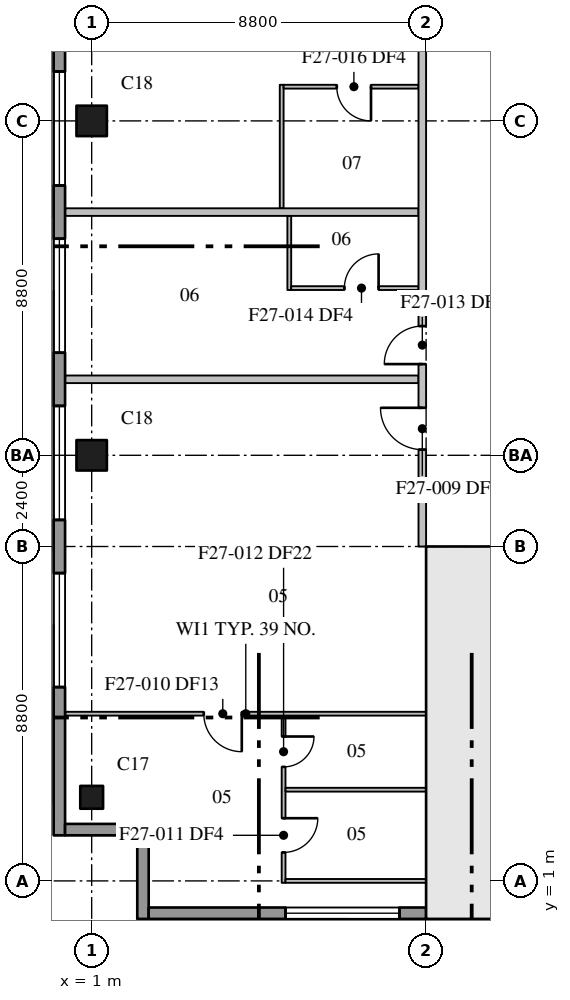
"""IFC4 building model, lengths in metres.
Left out: names, types, materials, properties, quantities, classifications, styles, units other than length and angle.
Written with IfcOpenShell. Run it as: python <this file> out.ifc"""

import sys

from ifc_helpers import new_model, si_unit, direction, frame, frame_2d, origin, origin_2d, place, context, subcontext, project, spatial, rectangle, extrude, element, fill, save


model = new_model("IFC4")
c1 = context("Model", 3, precision=1e-05, world=origin(), true_north=direction((0.0, 1.0)))
c2 = subcontext(c1, "Body", "Model", "MODEL_VIEW")
j1 = project(units=[si_unit("LENGTHUNIT", "METRE"), si_unit("PLANEANGLEUNIT", "RADIAN")], contexts=[c1])
p1 = place(None, origin())
s1 = spatial("IfcSite", under=j1, at=p1, CompositionType="ELEMENT")
p2 = place(p1, origin())
s2 = spatial("IfcBuilding", under=s1, at=p2, CompositionType="ELEMENT")
p3 = place(p2, frame((0.0, 0.0, 222.8)))
s3 = spatial("IfcBuildingStorey", under=s2, at=p3, CompositionType="ELEMENT", Elevation=222.8)
p4 = place(p3, frame((1.0, 3.2, 0.0), z_axis=(0.0, 0.0, 1.0), x_axis=(1.0, 0.0, 0.0)))
e1 = element("IfcColumn", 1, at=p4, inside=s3, PredefinedType="COLUMN", context=c2, shape_type="SweptSolid", body=[
    extrude(rectangle(XDim=0.6, YDim=0.6, at=origin_2d()), origin(), (0.0, 0.0, 1.0), 3.7),
])
for number, where, z_axis, x_axis in (
    (2, (1.0, 12.2, 0.0), (0.0, 0.0, 1.0), (1.0, 0.0, 0.0)),
    (3, (1.0, 21.0, 0.0), (0.0, 0.0, 1.0), (1.0, 0.0, 0.0)),
):
    element("IfcColumn", number, at=place(p3, frame(where, z_axis=z_axis, x_axis=x_axis)), inside=s3, PredefinedType="COLUMN", context=c2, shape_type="SweptSolid", body=[
        extrude(rectangle(XDim=0.8, YDim=0.8, at=origin_2d()), origin(), (0.0, 0.0, 1.0), 3.7),
    ])
p5 = place(p3, frame((9.8, 0.95, 0.0), z_axis=(0.0, 0.0, 1.0), x_axis=(1.0, 0.0, 0.0)))
e4 = element("IfcWall", 4, at=p5, inside=s3, PredefinedType="SHEAR", context=c2, shape_type="SweptSolid", body=[
    extrude(rectangle(XDim=35.2, YDim=0.5, at=frame_2d((17.6, 0.0))), origin(), (0.0, 0.0, 1.0), 3.7),
])
p6 = place(p3, frame((10.75, 1.2, 0.0), z_axis=(0.0, 0.0, 1.0), x_axis=(0.0, 1.0, 0.0)))
e5 = element("IfcWall", 5, at=p6, inside=s3, PredefinedType="SHEAR", context=c2, shape_type="SweptSolid", body=[
    extrude(rectangle(XDim=8.6, YDim=0.5, at=frame_2d((4.3, 0.0))), origin(), (0.0, 0.0, 1.0), 3.7),
])
p7 = place(p3, frame((9.8, 9.6, 0.0), z_axis=(0.0, 0.0, 1.0), x_axis=(1.0, 0.0, 0.0)))
e6 = element("IfcWall", 6, at=p7, inside=s3, PredefinedType="SHEAR", context=c2, shape_type="SweptSolid", body=[
    extrude(rectangle(XDim=4.3, YDim=0.4, at=frame_2d((2.15, 0.0))), origin(), (0.0, 0.0, 1.0), 3.7),
])
p8 = place(p7, frame((2.05, 0.0, 0.0)))
e7 = element("IfcOpeningElement", 7, at=p8, cuts=e6, PredefinedType="OPENING", context=c2, shape_type="SweptSolid", body=[
    extrude(rectangle(XDim=1.2, YDim=2.1, at=frame_2d((0.6, 1.05))), frame((0.0, 0.21, 0.0), z_axis=(0.0, -1.0, 0.0), x_axis=(1.0, 0.0, 0.0)), (0.0, 0.0, 1.0), 0.42),
])
p9 = place(p3, frame((0.15, 61.1, 0.0), z_axis=(0.0, 0.0, 1.0), x_axis=(0.0, -1.0, 0.0)))
e8 = element("IfcWall", 8, at=p9, inside=s3, PredefinedType="STANDARD", context=c2, shape_type="SweptSolid", body=[
    extrude(rectangle(XDim=58.9, YDim=0.3, at=frame_2d((29.45, 0.0))), origin(), (0.0, 0.0, 1.0), 3.4),
])
p10 = place(p9, frame((3.6, 0.0, 0.75)))
e9 = element("IfcOpeningElement", 9, at=p10, cuts=e8, PredefinedType="OPENING", context=c2, shape_type="SweptSolid", body=[
    extrude(rectangle(XDim=3.0, YDim=2.3, at=frame_2d((1.5, 1.15))), frame((0.0, 0.16, 0.0), z_axis=(0.0, -1.0, 0.0), x_axis=(1.0, 0.0, 0.0)), (0.0, 0.0, 1.0), 0.32),
])
p11 = place(p9, frame((8.0, 0.0, 0.75)))
e10 = element("IfcOpeningElement", 10, at=p11, cuts=e8, PredefinedType="OPENING", context=c2, shape_type="SweptSolid", body=[
    extrude(rectangle(XDim=3.0, YDim=2.3, at=frame_2d((1.5, 1.15))), frame((0.0, 0.16, 0.0), z_axis=(0.0, -1.0, 0.0), x_axis=(1.0, 0.0, 0.0)), (0.0, 0.0, 1.0), 0.32),
])
p12 = place(p9, frame((12.4, 0.0, 0.75)))
e11 = element("IfcOpeningElement", 11, at=p12, cuts=e8, PredefinedType="OPENING", context=c2, shape_type="SweptSolid", body=[
    extrude(rectangle(XDim=3.0, YDim=2.3, at=frame_2d((1.5, 1.15))), frame((0.0, 0.16, 0.0), z_axis=(0.0, -1.0, 0.0), x_axis=(1.0, 0.0, 0.0)), (0.0, 0.0, 1.0), 0.32),
])
p13 = place(p9, frame((16.8, 0.0, 0.75)))
e12 = element("IfcOpeningElement", 12, at=p13, cuts=e8, PredefinedType="OPENING", context=c2, shape_type="SweptSolid", body=[
    extrude(rectangle(XDim=3.0, YDim=2.3, at=frame_2d((1.5, 1.15))), frame((0.0, 0.16, 0.0), z_axis=(0.0, -1.0, 0.0), x_axis=(1.0, 0.0, 0.0)), (0.0, 0.0, 1.0), 0.32),
])
p14 = place(p9, frame((21.2, 0.0, 0.75)))
e13 = element("IfcOpeningElement", 13, at=p14, cuts=e8, PredefinedType="OPENING", context=c2, shape_type="SweptSolid", body=[
    extrude(rectangle(XDim=3.0, YDim=2.3, at=frame_2d((1.5, 1.15))), frame((0.0, 0.16, 0.0), z_axis=(0.0, -1.0, 0.0), x_axis=(1.0, 0.0, 0.0)), (0.0, 0.0, 1.0), 0.32),
])
p15 = place(p9, frame((25.6, 0.0, 0.75)))
e14 = element("IfcOpeningElement", 14, at=p15, cuts=e8, PredefinedType="OPENING", context=c2, shape_type="SweptSolid", body=[
    extrude(rectangle(XDim=3.0, YDim=2.3, at=frame_2d((1.5, 1.15))), frame((0.0, 0.16, 0.0), z_axis=(0.0, -1.0, 0.0), x_axis=(1.0, 0.0, 0.0)), (0.0, 0.0, 1.0), 0.32),
])
p16 = place(p9, frame((30.0, 0.0, 0.75)))
e15 = element("IfcOpeningElement", 15, at=p16, cuts=e8, PredefinedType="OPENING", context=c2, shape_type="SweptSolid", body=[
    extrude(rectangle(XDim=3.0, YDim=2.3, at=frame_2d((1.5, 1.15))), frame((0.0, 0.16, 0.0), z_axis=(0.0, -1.0, 0.0), x_axis=(1.0, 0.0, 0.0)), (0.0, 0.0, 1.0), 0.32),
])
p17 = place(p9, frame((34.4, 0.0, 0.75)))
e16 = element("IfcOpeningElement", 16, at=p17, cuts=e8, PredefinedType="OPENING", context=c2, shape_type="SweptSolid", body=[
    extrude(rectangle(XDim=3.0, YDim=2.3, at=frame_2d((1.5, 1.15))), frame((0.0, 0.16, 0.0), z_axis=(0.0, -1.0, 0.0), x_axis=(1.0, 0.0, 0.0)), (0.0, 0.0, 1.0), 0.32),
])
p18 = place(p9, frame((38.8, 0.0, 0.75)))
e17 = element("IfcOpeningElement", 17, at=p18, cuts=e8, PredefinedType="OPENING", context=c2, shape_type="SweptSolid", body=[
    extrude(rectangle(XDim=3.0, YDim=2.3, at=frame_2d((1.5, 1.15))), frame((0.0, 0.16, 0.0), z_axis=(0.0, -1.0, 0.0), x_axis=(1.0, 0.0, 0.0)), (0.0, 0.0, 1.0), 0.32),
])
p19 = place(p9, frame((43.2, 0.0, 0.75)))
e18 = element("IfcOpeningElement", 18, at=p19, cuts=e8, PredefinedType="OPENING", context=c2, shape_type="SweptSolid", body=[
    extrude(rectangle(XDim=3.0, YDim=2.3, at=frame_2d((1.5, 1.15))), frame((0.0, 0.16, 0.0), z_axis=(0.0, -1.0, 0.0), x_axis=(1.0, 0.0, 0.0)), (0.0, 0.0, 1.0), 0.32),
])
p20 = place(p9, frame((47.6, 0.0, 0.75)))
e19 = element("IfcOpeningElement", 19, at=p20, cuts=e8, PredefinedType="OPENING", context=c2, shape_type="SweptSolid", body=[
    extrude(rectangle(XDim=3.0, YDim=2.3, at=frame_2d((1.5, 1.15))), frame((0.0, 0.16, 0.0), z_axis=(0.0, -1.0, 0.0), x_axis=(1.0, 0.0, 0.0)), (0.0, 0.0, 1.0), 0.32),
])
p21 = place(p9, frame((52.0, 0.0, 0.75)))
e20 = element("IfcOpeningElement", 20, at=p21, cuts=e8, PredefinedType="OPENING", context=c2, shape_type="SweptSolid", body=[
    extrude(rectangle(XDim=3.0, YDim=2.3, at=frame_2d((1.5, 1.15))), frame((0.0, 0.16, 0.0), z_axis=(0.0, -1.0, 0.0), x_axis=(1.0, 0.0, 0.0)), (0.0, 0.0, 1.0), 0.32),
])
for number, where, z_axis, x_axis in (
    (21, (0.3, 2.35, 0.0), (0.0, 0.0, 1.0), (1.0, 0.0, 0.0)),
    (22, (2.35, 2.2, 0.0), (0.0, 0.0, 1.0), (0.0, -1.0, 0.0)),
):
    element("IfcWall", number, at=place(p3, frame(where, z_axis=z_axis, x_axis=x_axis)), inside=s3, PredefinedType="STANDARD", context=c2, shape_type="SweptSolid", body=[
        extrude(rectangle(XDim=2.2, YDim=0.3, at=frame_2d((1.1, 0.0))), origin(), (0.0, 0.0, 1.0), 3.4),
    ])
p22 = place(p3, frame((2.5, 0.15, 0.0), z_axis=(0.0, 0.0, 1.0), x_axis=(1.0, 0.0, 0.0)))
e23 = element("IfcWall", 23, at=p22, inside=s3, PredefinedType="STANDARD", context=c2, shape_type="SweptSolid", body=[
    extrude(rectangle(XDim=7.3, YDim=0.3, at=frame_2d((3.65, 0.0))), origin(), (0.0, 0.0, 1.0), 3.4),
])
p23 = place(p22, frame((3.6, 0.0, 0.75)))
e24 = element("IfcOpeningElement", 24, at=p23, cuts=e23, PredefinedType="OPENING", context=c2, shape_type="SweptSolid", body=[
    extrude(rectangle(XDim=3.0, YDim=2.3, at=frame_2d((1.5, 1.15))), frame((0.0, 0.16, 0.0), z_axis=(0.0, -1.0, 0.0), x_axis=(1.0, 0.0, 0.0)), (0.0, 0.0, 1.0), 0.32),
])
p24 = place(p3, frame((9.7, 9.8, 0.0), z_axis=(0.0, 0.0, 1.0), x_axis=(0.0, 1.0, 0.0)))
e25 = element("IfcWall", 25, at=p24, inside=s3, PredefinedType="PARTITIONING", context=c2, shape_type="SweptSolid", body=[
    extrude(rectangle(XDim=48.0, YDim=0.2, at=frame_2d((24.0, 0.0))), origin(), (0.0, 0.0, 1.0), 3.4),
])
p25 = place(p24, frame((2.55, 0.0, 0.0)))
e26 = element("IfcOpeningElement", 26, at=p25, cuts=e25, PredefinedType="OPENING", context=c2, shape_type="SweptSolid", body=[
    extrude(rectangle(XDim=1.1, YDim=2.1, at=frame_2d((0.55, 1.05))), frame((0.0, 0.11, 0.0), z_axis=(0.0, -1.0, 0.0), x_axis=(1.0, 0.0, 0.0)), (0.0, 0.0, 1.0), 0.22),
])
p26 = place(p24, frame((4.8, 0.0, 0.0)))
e27 = element("IfcOpeningElement", 27, at=p26, cuts=e25, PredefinedType="OPENING", context=c2, shape_type="SweptSolid", body=[
    extrude(rectangle(XDim=1.0, YDim=2.1, at=frame_2d((0.5, 1.05))), frame((0.0, 0.11, 0.0), z_axis=(0.0, -1.0, 0.0), x_axis=(1.0, 0.0, 0.0)), (0.0, 0.0, 1.0), 0.22),
])
p27 = place(p24, frame((17.2, 0.0, 0.0)))
e28 = element("IfcOpeningElement", 28, at=p27, cuts=e25, PredefinedType="OPENING", context=c2, shape_type="SweptSolid", body=[
    extrude(rectangle(XDim=1.1, YDim=2.1, at=frame_2d((0.55, 1.05))), frame((0.0, 0.11, 0.0), z_axis=(0.0, -1.0, 0.0), x_axis=(1.0, 0.0, 0.0)), (0.0, 0.0, 1.0), 0.22),
])
p28 = place(p24, frame((22.4, 0.0, 0.0)))
e29 = element("IfcOpeningElement", 29, at=p28, cuts=e25, PredefinedType="OPENING", context=c2, shape_type="SweptSolid", body=[
    extrude(rectangle(XDim=1.0, YDim=2.1, at=frame_2d((0.5, 1.05))), frame((0.0, 0.11, 0.0), z_axis=(0.0, -1.0, 0.0), x_axis=(1.0, 0.0, 0.0)), (0.0, 0.0, 1.0), 0.22),
])
p29 = place(p24, frame((32.6, 0.0, 0.0)))
e30 = element("IfcOpeningElement", 30, at=p29, cuts=e25, PredefinedType="OPENING", context=c2, shape_type="SweptSolid", body=[
    extrude(rectangle(XDim=1.1, YDim=2.1, at=frame_2d((0.55, 1.05))), frame((0.0, 0.11, 0.0), z_axis=(0.0, -1.0, 0.0), x_axis=(1.0, 0.0, 0.0)), (0.0, 0.0, 1.0), 0.22),
])
p30 = place(p24, frame((35.6, 0.0, 0.0)))
e31 = element("IfcOpeningElement", 31, at=p30, cuts=e25, PredefinedType="OPENING", context=c2, shape_type="SweptSolid", body=[
    extrude(rectangle(XDim=1.0, YDim=2.1, at=frame_2d((0.5, 1.05))), frame((0.0, 0.11, 0.0), z_axis=(0.0, -1.0, 0.0), x_axis=(1.0, 0.0, 0.0)), (0.0, 0.0, 1.0), 0.22),
])
p31 = place(p24, frame((45.6, 0.0, 0.0)))
e32 = element("IfcOpeningElement", 32, at=p31, cuts=e25, PredefinedType="OPENING", context=c2, shape_type="SweptSolid", body=[
    extrude(rectangle(XDim=1.1, YDim=2.1, at=frame_2d((0.55, 1.05))), frame((0.0, 0.11, 0.0), z_axis=(0.0, -1.0, 0.0), x_axis=(1.0, 0.0, 0.0)), (0.0, 0.0, 1.0), 0.22),
])
for number, where, z_axis, x_axis in (
    (33, (0.31, 14.2, 0.0), (0.0, 0.0, 1.0), (1.0, 0.0, 0.0)),
    (34, (0.31, 18.6, 0.0), (0.0, 0.0, 1.0), (1.0, 0.0, 0.0)),
):
    element("IfcWall", number, at=place(p3, frame(where, z_axis=z_axis, x_axis=x_axis)), inside=s3, PredefinedType="PARTITIONING", context=c2, shape_type="SweptSolid", body=[
        extrude(rectangle(XDim=9.29, YDim=0.2, at=frame_2d((4.645, 0.0))), origin(), (0.0, 0.0, 1.0), 3.4),
    ])
p32 = place(p3, frame((6.05, 5.35, 0.0), z_axis=(0.0, 0.0, 1.0), x_axis=(0.0, -1.0, 0.0)))
e35 = element("IfcWall", 35, at=p32, inside=s3, PredefinedType="PARTITIONING", context=c2, shape_type="SweptSolid", body=[
    extrude(rectangle(XDim=4.4, YDim=0.1, at=frame_2d((2.2, 0.0))), origin(), (0.0, 0.0, 1.0), 3.4),
])
p33 = place(p32, frame((2.7, 0.0, 0.0)))
e36 = element("IfcOpeningElement", 36, at=p33, cuts=e35, PredefinedType="OPENING", context=c2, shape_type="SweptSolid", body=[
    extrude(rectangle(XDim=0.9, YDim=2.1, at=frame_2d((0.45, 1.05))), frame((0.0, 0.06, 0.0), z_axis=(0.0, -1.0, 0.0), x_axis=(1.0, 0.0, 0.0)), (0.0, 0.0, 1.0), 0.12),
])
p34 = place(p32, frame((0.55, 0.0, 0.0)))
e37 = element("IfcOpeningElement", 37, at=p34, cuts=e35, PredefinedType="OPENING", context=c2, shape_type="SweptSolid", body=[
    extrude(rectangle(XDim=0.8, YDim=2.1, at=frame_2d((0.4, 1.05))), frame((0.0, 0.06, 0.0), z_axis=(0.0, -1.0, 0.0), x_axis=(1.0, 0.0, 0.0)), (0.0, 0.0, 1.0), 0.12),
])
p35 = place(p3, frame((9.8, 5.4, 0.0), z_axis=(0.0, 0.0, 1.0), x_axis=(-1.0, 0.0, 0.0)))
e38 = element("IfcWall", 38, at=p35, inside=s3, PredefinedType="PARTITIONING", context=c2, shape_type="SweptSolid", body=[
    extrude(rectangle(XDim=9.49, YDim=0.1, at=frame_2d((4.745, 0.0))), origin(), (0.0, 0.0, 1.0), 3.4),
])
p36 = place(p35, frame((4.85, 0.0, 0.0)))
e39 = element("IfcOpeningElement", 39, at=p36, cuts=e38, PredefinedType="OPENING", context=c2, shape_type="SweptSolid", body=[
    extrude(rectangle(XDim=1.0, YDim=2.1, at=frame_2d((0.5, 1.05))), frame((0.0, 0.06, 0.0), z_axis=(0.0, -1.0, 0.0), x_axis=(1.0, 0.0, 0.0)), (0.0, 0.0, 1.0), 0.12),
])
for number, where, z_axis, x_axis in (
    (40, (6.1, 1.0, 0.0), (0.0, 0.0, 1.0), (1.0, 0.0, 0.0)),
    (41, (6.1, 3.4, 0.0), (0.0, 0.0, 1.0), (1.0, 0.0, 0.0)),
):
    element("IfcWall", number, at=place(p3, frame(where, z_axis=z_axis, x_axis=x_axis)), inside=s3, PredefinedType="PARTITIONING", context=c2, shape_type="SweptSolid", body=[
        extrude(rectangle(XDim=3.7, YDim=0.1, at=frame_2d((1.85, 0.0))), origin(), (0.0, 0.0, 1.0), 3.4),
    ])
p37 = place(p3, frame((6.2, 16.55, 0.0), z_axis=(0.0, 0.0, 1.0), x_axis=(0.0, 1.0, 0.0)))
e42 = element("IfcWall", 42, at=p37, inside=s3, PredefinedType="PARTITIONING", context=c2, shape_type="SweptSolid", body=[
    extrude(rectangle(XDim=1.95, YDim=0.1, at=frame_2d((0.975, 0.0))), origin(), (0.0, 0.0, 1.0), 3.4),
])
p38 = place(p3, frame((6.25, 16.6, 0.0), z_axis=(0.0, 0.0, 1.0), x_axis=(1.0, 0.0, 0.0)))
e43 = element("IfcWall", 43, at=p38, inside=s3, PredefinedType="PARTITIONING", context=c2, shape_type="SweptSolid", body=[
    extrude(rectangle(XDim=3.35, YDim=0.1, at=frame_2d((1.675, 0.0))), origin(), (0.0, 0.0, 1.0), 3.4),
])
p39 = place(p38, frame((1.4, 0.0, 0.0)))
e44 = element("IfcOpeningElement", 44, at=p39, cuts=e43, PredefinedType="OPENING", context=c2, shape_type="SweptSolid", body=[
    extrude(rectangle(XDim=0.9, YDim=2.1, at=frame_2d((0.45, 1.05))), frame((0.0, 0.06, 0.0), z_axis=(0.0, -1.0, 0.0), x_axis=(1.0, 0.0, 0.0)), (0.0, 0.0, 1.0), 0.12),
])
p40 = place(p3, frame((6.0, 18.7, 0.0), z_axis=(0.0, 0.0, 1.0), x_axis=(0.0, 1.0, 0.0)))
e45 = element("IfcWall", 45, at=p40, inside=s3, PredefinedType="PARTITIONING", context=c2, shape_type="SweptSolid", body=[
    extrude(rectangle(XDim=3.25, YDim=0.1, at=frame_2d((1.625, 0.0))), origin(), (0.0, 0.0, 1.0), 3.4),
])
p41 = place(p3, frame((9.6, 21.9, 0.0), z_axis=(0.0, 0.0, 1.0), x_axis=(-1.0, 0.0, 0.0)))
e46 = element("IfcWall", 46, at=p41, inside=s3, PredefinedType="PARTITIONING", context=c2, shape_type="SweptSolid", body=[
    extrude(rectangle(XDim=3.55, YDim=0.1, at=frame_2d((1.775, 0.0))), origin(), (0.0, 0.0, 1.0), 3.4),
])
p42 = place(p41, frame((1.25, 0.0, 0.0)))
e47 = element("IfcOpeningElement", 47, at=p42, cuts=e46, PredefinedType="OPENING", context=c2, shape_type="SweptSolid", body=[
    extrude(rectangle(XDim=0.9, YDim=2.1, at=frame_2d((0.45, 1.05))), frame((0.0, 0.06, 0.0), z_axis=(0.0, -1.0, 0.0), x_axis=(1.0, 0.0, 0.0)), (0.0, 0.0, 1.0), 0.12),
])
p43 = place(p18, origin())
e48 = element("IfcWindow", 48, at=p43, inside=s3, PartitioningType="SINGLE_PANEL", PredefinedType="WINDOW", context=c2, shape_type="SweptSolid", body=[
    extrude(rectangle(XDim=3.0, YDim=2.3, at=frame_2d((1.5, 1.15))), frame((0.0, 0.03, 0.0), z_axis=(0.0, -1.0, 0.0), x_axis=(1.0, 0.0, 0.0)), (0.0, 0.0, 1.0), 0.06),
])
fill(e17, e48)
p44 = place(p19, origin())
e49 = element("IfcWindow", 49, at=p44, inside=s3, PartitioningType="SINGLE_PANEL", PredefinedType="WINDOW", context=c2, shape_type="SweptSolid", body=[
    extrude(rectangle(XDim=3.0, YDim=2.3, at=frame_2d((1.5, 1.15))), frame((0.0, 0.03, 0.0), z_axis=(0.0, -1.0, 0.0), x_axis=(1.0, 0.0, 0.0)), (0.0, 0.0, 1.0), 0.06),
])
fill(e18, e49)
p45 = place(p20, origin())
e50 = element("IfcWindow", 50, at=p45, inside=s3, PartitioningType="SINGLE_PANEL", PredefinedType="WINDOW", context=c2, shape_type="SweptSolid", body=[
    extrude(rectangle(XDim=3.0, YDim=2.3, at=frame_2d((1.5, 1.15))), frame((0.0, 0.03, 0.0), z_axis=(0.0, -1.0, 0.0), x_axis=(1.0, 0.0, 0.0)), (0.0, 0.0, 1.0), 0.06),
])
fill(e19, e50)
p46 = place(p21, origin())
e51 = element("IfcWindow", 51, at=p46, inside=s3, PartitioningType="SINGLE_PANEL", PredefinedType="WINDOW", context=c2, shape_type="SweptSolid", body=[
    extrude(rectangle(XDim=3.0, YDim=2.3, at=frame_2d((1.5, 1.15))), frame((0.0, 0.03, 0.0), z_axis=(0.0, -1.0, 0.0), x_axis=(1.0, 0.0, 0.0)), (0.0, 0.0, 1.0), 0.06),
])
fill(e20, e51)
p47 = place(p23, origin())
e52 = element("IfcWindow", 52, at=p47, inside=s3, PartitioningType="SINGLE_PANEL", PredefinedType="WINDOW", context=c2, shape_type="SweptSolid", body=[
    extrude(rectangle(XDim=3.0, YDim=2.3, at=frame_2d((1.5, 1.15))), frame((0.0, 0.03, 0.0), z_axis=(0.0, -1.0, 0.0), x_axis=(1.0, 0.0, 0.0)), (0.0, 0.0, 1.0), 0.06),
])
fill(e24, e52)
p48 = place(p25, origin())
e53 = element("IfcDoor", 53, at=p48, inside=s3, OperationType="SINGLE_SWING_RIGHT", PredefinedType="DOOR", context=c2, shape_type="SweptSolid", body=[
    extrude(rectangle(XDim=1.1, YDim=2.1, at=frame_2d((0.55, 1.05))), frame((0.0, 0.025, 0.0), z_axis=(0.0, -1.0, 0.0), x_axis=(1.0, 0.0, 0.0)), (0.0, 0.0, 1.0), 0.05),
])
fill(e26, e53)
p49 = place(p36, origin())
e54 = element("IfcDoor", 54, at=p49, inside=s3, OperationType="SINGLE_SWING_LEFT", PredefinedType="DOOR", context=c2, shape_type="SweptSolid", body=[
    extrude(rectangle(XDim=1.0, YDim=2.1, at=frame_2d((0.5, 1.05))), frame((0.0, 0.025, 0.0), z_axis=(0.0, -1.0, 0.0), x_axis=(1.0, 0.0, 0.0)), (0.0, 0.0, 1.0), 0.05),
])
fill(e39, e54)
p50 = place(p33, origin())
e55 = element("IfcDoor", 55, at=p50, inside=s3, OperationType="SINGLE_SWING_LEFT", PredefinedType="DOOR", context=c2, shape_type="SweptSolid", body=[
    extrude(rectangle(XDim=0.9, YDim=2.1, at=frame_2d((0.45, 1.05))), frame((0.0, 0.025, 0.0), z_axis=(0.0, -1.0, 0.0), x_axis=(1.0, 0.0, 0.0)), (0.0, 0.0, 1.0), 0.05),
])
fill(e36, e55)
p51 = place(p34, origin())
e56 = element("IfcDoor", 56, at=p51, inside=s3, OperationType="SINGLE_SWING_LEFT", PredefinedType="DOOR", context=c2, shape_type="SweptSolid", body=[
    extrude(rectangle(XDim=0.8, YDim=2.1, at=frame_2d((0.4, 1.05))), frame((0.0, 0.025, 0.0), z_axis=(0.0, -1.0, 0.0), x_axis=(1.0, 0.0, 0.0)), (0.0, 0.0, 1.0), 0.05),
])
fill(e37, e56)
p52 = place(p26, origin())
e57 = element("IfcDoor", 57, at=p52, inside=s3, OperationType="SINGLE_SWING_LEFT", PredefinedType="DOOR", context=c2, shape_type="SweptSolid", body=[
    extrude(rectangle(XDim=1.0, YDim=2.1, at=frame_2d((0.5, 1.05))), frame((0.0, 0.025, 0.0), z_axis=(0.0, -1.0, 0.0), x_axis=(1.0, 0.0, 0.0)), (0.0, 0.0, 1.0), 0.05),
])
fill(e27, e57)
p53 = place(p39, origin())
e58 = element("IfcDoor", 58, at=p53, inside=s3, OperationType="SINGLE_SWING_RIGHT", PredefinedType="DOOR", context=c2, shape_type="SweptSolid", body=[
    extrude(rectangle(XDim=0.9, YDim=2.1, at=frame_2d((0.45, 1.05))), frame((0.0, 0.025, 0.0), z_axis=(0.0, -1.0, 0.0), x_axis=(1.0, 0.0, 0.0)), (0.0, 0.0, 1.0), 0.05),
])
fill(e44, e58)
p54 = place(p42, origin())
e59 = element("IfcDoor", 59, at=p54, inside=s3, OperationType="SINGLE_SWING_LEFT", PredefinedType="DOOR", context=c2, shape_type="SweptSolid", body=[
    extrude(rectangle(XDim=0.9, YDim=2.1, at=frame_2d((0.45, 1.05))), frame((0.0, 0.025, 0.0), z_axis=(0.0, -1.0, 0.0), x_axis=(1.0, 0.0, 0.0)), (0.0, 0.0, 1.0), 0.05),
])
fill(e47, e59)
save(model, sys.argv[1])
